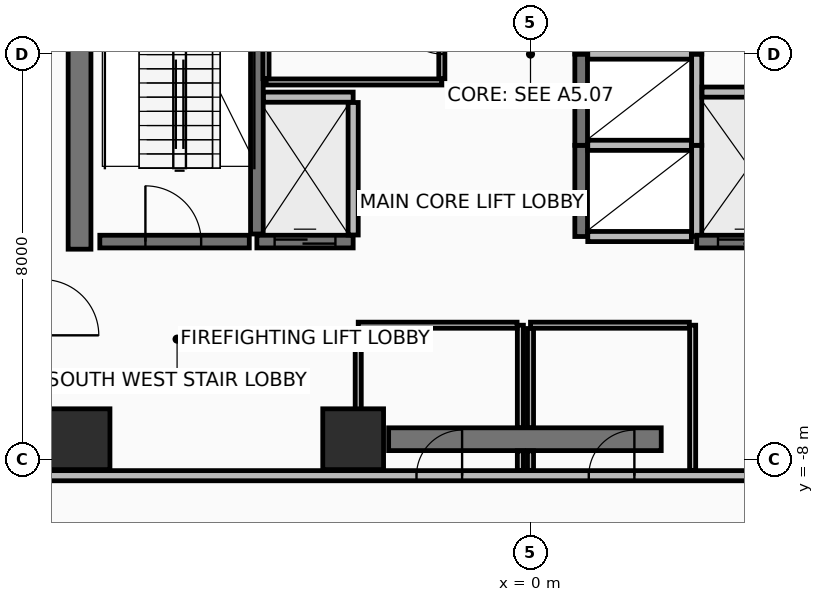
"""IFC4 building model, lengths in metres.
Left out: names, types, materials, properties, quantities, classifications, styles, units other than length and angle.
Written with IfcOpenShell. Run it as: python <this file> out.ifc"""

import sys

from ifc_helpers import new_model, si_unit, direction, frame, frame_2d, origin, origin_2d, place, context, subcontext, project, spatial, rectangle, extrude, element, fill, save


model = new_model("IFC4")
c1 = context("Model", 3, precision=1e-05, world=origin(), true_north=direction((0.0, 1.0)))
c2 = subcontext(c1, "Body", "Model", "MODEL_VIEW")
j1 = project(units=[si_unit("LENGTHUNIT", "METRE"), si_unit("PLANEANGLEUNIT", "RADIAN")], contexts=[c1])
p1 = place(None, origin())
s1 = spatial("IfcSite", under=j1, at=p1, CompositionType="ELEMENT")
p2 = place(p1, origin())
s2 = spatial("IfcBuilding", under=s1, at=p2, CompositionType="ELEMENT")
p3 = place(p2, frame((0.0, 0.0, 89.7)))
s3 = spatial("IfcBuildingStorey", under=s2, at=p3, CompositionType="ELEMENT", Elevation=89.7)
for number, where, z_axis, x_axis in (
    (1, (-8.9, -7.6, 0.0), (0.0, 0.0, 1.0), (1.0, 0.0, 0.0)),
    (2, (-3.5, -7.6, 0.0), (0.0, 0.0, 1.0), (1.0, 0.0, 0.0)),
):
    element("IfcColumn", number, at=place(p3, frame(where, z_axis=z_axis, x_axis=x_axis)), inside=s3, PredefinedType="COLUMN", context=c2, shape_type="SweptSolid", body=[
        extrude(rectangle(XDim=1.2, YDim=1.2, at=origin_2d()), origin(), (0.0, 0.0, 1.0), 3.6),
    ])
p4 = place(p3, frame((-2.8, -7.6, 0.0), z_axis=(0.0, 0.0, 1.0), x_axis=(1.0, 0.0, 0.0)))
e3 = element("IfcWall", 3, at=p4, inside=s3, PredefinedType="SHEAR", context=c2, shape_type="SweptSolid", body=[
    extrude(rectangle(XDim=5.38, YDim=0.45, at=frame_2d((2.69, 0.0))), origin(), (0.0, 0.0, 1.0), 3.41),
])
p5 = place(p3, frame((-8.9, -3.85, 0.0), z_axis=(0.0, 0.0, 1.0), x_axis=(0.0, 1.0, 0.0)))
e4 = element("IfcWall", 4, at=p5, inside=s3, PredefinedType="SHEAR", context=c2, shape_type="SweptSolid", body=[
    extrude(rectangle(XDim=10.7, YDim=0.45, at=frame_2d((5.35, 0.0))), origin(), (0.0, 0.0, 1.0), 3.41),
])
p6 = place(p3, frame((-9.62, -8.32, 0.0), z_axis=(0.0, 0.0, 1.0), x_axis=(1.0, 0.0, 0.0)))
e5 = element("IfcWall", 5, at=p6, inside=s3, PredefinedType="PARTITIONING", context=c2, shape_type="SweptSolid", body=[
    extrude(rectangle(XDim=19.24, YDim=0.2, at=frame_2d((9.62, 0.0))), origin(), (0.0, 0.0, 1.0), 2.805),
])
p7 = place(p6, frame((7.37, 0.0, 0.0)))
e6 = element("IfcOpeningElement", 6, at=p7, cuts=e5, PredefinedType="OPENING", context=c2, shape_type="SweptSolid", body=[
    extrude(rectangle(XDim=0.9, YDim=2.1, at=frame_2d((0.45, 1.05))), frame((0.0, 0.11, 0.0), z_axis=(0.0, -1.0, 0.0), x_axis=(1.0, 0.0, 0.0)), (0.0, 0.0, 1.0), 0.22),
])
p8 = place(p6, frame((10.77, 0.0, 0.0)))
e7 = element("IfcOpeningElement", 7, at=p8, cuts=e5, PredefinedType="OPENING", context=c2, shape_type="SweptSolid", body=[
    extrude(rectangle(XDim=0.9, YDim=2.1, at=frame_2d((0.45, 1.05))), frame((0.0, 0.11, 0.0), z_axis=(0.0, -1.0, 0.0), x_axis=(1.0, 0.0, 0.0)), (0.0, 0.0, 1.0), 0.22),
])
p9 = place(p3, frame((-5.4, -3.55, 0.0), z_axis=(0.0, 0.0, 1.0), x_axis=(0.0, 1.0, 0.0)))
e8 = element("IfcWall", 8, at=p9, inside=s3, PredefinedType="SHEAR", context=c2, shape_type="SweptSolid", body=[
    extrude(rectangle(XDim=7.3, YDim=0.25, at=frame_2d((3.65, 0.0))), origin(), (0.0, 0.0, 1.0), 3.41),
])
p10 = place(p3, frame((-8.5, -3.7, 0.0), z_axis=(0.0, 0.0, 1.0), x_axis=(1.0, 0.0, 0.0)))
e9 = element("IfcWall", 9, at=p10, inside=s3, PredefinedType="SHEAR", context=c2, shape_type="SweptSolid", body=[
    extrude(rectangle(XDim=2.95, YDim=0.25, at=frame_2d((1.475, 0.0))), origin(), (0.0, 0.0, 1.0), 3.41),
])
p11 = place(p10, frame((0.9, 0.0, 0.0)))
e10 = element("IfcOpeningElement", 10, at=p11, cuts=e9, PredefinedType="OPENING", context=c2, shape_type="SweptSolid", body=[
    extrude(rectangle(XDim=1.1, YDim=2.15, at=frame_2d((0.55, 1.075))), frame((0.0, 0.135, 0.0), z_axis=(0.0, -1.0, 0.0), x_axis=(1.0, 0.0, 0.0)), (0.0, 0.0, 1.0), 0.27),
])
p12 = place(p3, frame((1.0, -3.6, 0.0), z_axis=(0.0, 0.0, 1.0), x_axis=(0.0, 1.0, 0.0)))
e11 = element("IfcWall", 11, at=p12, inside=s3, PredefinedType="SHEAR", context=c2, shape_type="SweptSolid", body=[
    extrude(rectangle(XDim=1.8, YDim=0.25, at=frame_2d((0.9, 0.0))), origin(), (0.0, 0.0, 1.0), 3.41),
])
p13 = place(p3, frame((3.28, -3.6, 0.0), z_axis=(0.0, 0.0, 1.0), x_axis=(0.0, 1.0, 0.0)))
e12 = element("IfcWall", 12, at=p13, inside=s3, PredefinedType="PARTITIONING", context=c2, shape_type="SweptSolid", body=[
    extrude(rectangle(XDim=1.8, YDim=0.2, at=frame_2d((0.9, 0.0))), origin(), (0.0, 0.0, 1.0), 3.41),
])
for number, where, z_axis, x_axis in (
    (13, (1.13, -3.6, 0.0), (0.0, 0.0, 1.0), (1.0, 0.0, 0.0)),
    (14, (1.13, -1.8, 0.0), (0.0, 0.0, 1.0), (1.0, 0.0, 0.0)),
):
    element("IfcWall", number, at=place(p3, frame(where, z_axis=z_axis, x_axis=x_axis)), inside=s3, PredefinedType="PARTITIONING", context=c2, shape_type="SweptSolid", body=[
        extrude(rectangle(XDim=2.045, YDim=0.2, at=frame_2d((1.022, 0.0))), origin(), (0.0, 0.0, 1.0), 3.41),
    ])
p14 = place(p3, frame((1.0, -1.8, 0.0), z_axis=(0.0, 0.0, 1.0), x_axis=(0.0, 1.0, 0.0)))
e15 = element("IfcWall", 15, at=p14, inside=s3, PredefinedType="SHEAR", context=c2, shape_type="SweptSolid", body=[
    extrude(rectangle(XDim=1.8, YDim=0.25, at=frame_2d((0.9, 0.0))), origin(), (0.0, 0.0, 1.0), 3.41),
])
p15 = place(p3, frame((3.28, -1.8, 0.0), z_axis=(0.0, 0.0, 1.0), x_axis=(0.0, 1.0, 0.0)))
e16 = element("IfcWall", 16, at=p15, inside=s3, PredefinedType="PARTITIONING", context=c2, shape_type="SweptSolid", body=[
    extrude(rectangle(XDim=1.8, YDim=0.2, at=frame_2d((0.9, 0.0))), origin(), (0.0, 0.0, 1.0), 3.41),
])
p16 = place(p3, frame((1.13, 0.0, 0.0), z_axis=(0.0, 0.0, 1.0), x_axis=(1.0, 0.0, 0.0)))
e17 = element("IfcWall", 17, at=p16, inside=s3, PredefinedType="PARTITIONING", context=c2, shape_type="SweptSolid", body=[
    extrude(rectangle(XDim=2.045, YDim=0.2, at=frame_2d((1.022, 0.0))), origin(), (0.0, 0.0, 1.0), 3.41),
])
p17 = place(p3, frame((1.0, 0.0, 0.0), z_axis=(0.0, 0.0, 1.0), x_axis=(0.0, 1.0, 0.0)))
e18 = element("IfcWall", 18, at=p17, inside=s3, PredefinedType="SHEAR", context=c2, shape_type="SweptSolid", body=[
    extrude(rectangle(XDim=1.8, YDim=0.25, at=frame_2d((0.9, 0.0))), origin(), (0.0, 0.0, 1.0), 3.41),
])
p18 = place(p3, frame((3.28, 0.0, 0.0), z_axis=(0.0, 0.0, 1.0), x_axis=(0.0, 1.0, 0.0)))
e19 = element("IfcWall", 19, at=p18, inside=s3, PredefinedType="PARTITIONING", context=c2, shape_type="SweptSolid", body=[
    extrude(rectangle(XDim=1.8, YDim=0.2, at=frame_2d((0.9, 0.0))), origin(), (0.0, 0.0, 1.0), 3.41),
])
p19 = place(p3, frame((-5.4, -3.7, 0.0), z_axis=(0.0, 0.0, 1.0), x_axis=(1.0, 0.0, 0.0)))
e20 = element("IfcWall", 20, at=p19, inside=s3, PredefinedType="SHEAR", context=c2, shape_type="SweptSolid", body=[
    extrude(rectangle(XDim=1.9, YDim=0.25, at=frame_2d((0.95, 0.0))), origin(), (0.0, 0.0, 1.0), 3.41),
])
p20 = place(p19, frame((0.35, 0.0, 0.0)))
e21 = element("IfcOpeningElement", 21, at=p20, cuts=e20, PredefinedType="OPENING", context=c2, shape_type="SweptSolid", body=[
    extrude(rectangle(XDim=1.2, YDim=2.2, at=frame_2d((0.6, 1.1))), frame((0.0, 0.135, 0.0), z_axis=(0.0, -1.0, 0.0), x_axis=(1.0, 0.0, 0.0)), (0.0, 0.0, 1.0), 0.27),
])
p21 = place(p3, frame((-5.27, -0.85, 0.0), z_axis=(0.0, 0.0, 1.0), x_axis=(1.0, 0.0, 0.0)))
e22 = element("IfcWall", 22, at=p21, inside=s3, PredefinedType="PARTITIONING", context=c2, shape_type="SweptSolid", body=[
    extrude(rectangle(XDim=1.77, YDim=0.2, at=frame_2d((0.885, 0.0))), origin(), (0.0, 0.0, 1.0), 3.41),
])
p22 = place(p3, frame((-3.5, -3.57, 0.0), z_axis=(0.0, 0.0, 1.0), x_axis=(0.0, 1.0, 0.0)))
e23 = element("IfcWall", 23, at=p22, inside=s3, PredefinedType="PARTITIONING", context=c2, shape_type="SweptSolid", body=[
    extrude(rectangle(XDim=2.615, YDim=0.2, at=frame_2d((1.308, 0.0))), origin(), (0.0, 0.0, 1.0), 3.41),
])
p23 = place(p3, frame((3.28, -3.7, 0.0), z_axis=(0.0, 0.0, 1.0), x_axis=(1.0, 0.0, 0.0)))
e24 = element("IfcWall", 24, at=p23, inside=s3, PredefinedType="SHEAR", context=c2, shape_type="SweptSolid", body=[
    extrude(rectangle(XDim=1.94, YDim=0.25, at=frame_2d((0.97, 0.0))), origin(), (0.0, 0.0, 1.0), 3.41),
])
p24 = place(p23, frame((0.42, 0.0, 0.0)))
e25 = element("IfcOpeningElement", 25, at=p24, cuts=e24, PredefinedType="OPENING", context=c2, shape_type="SweptSolid", body=[
    extrude(rectangle(XDim=1.1, YDim=2.2, at=frame_2d((0.55, 1.1))), frame((0.0, 0.135, 0.0), z_axis=(0.0, -1.0, 0.0), x_axis=(1.0, 0.0, 0.0)), (0.0, 0.0, 1.0), 0.27),
])
p25 = place(p3, frame((3.385, -0.75, 0.0), z_axis=(0.0, 0.0, 1.0), x_axis=(1.0, 0.0, 0.0)))
e26 = element("IfcWall", 26, at=p25, inside=s3, PredefinedType="PARTITIONING", context=c2, shape_type="SweptSolid", body=[
    extrude(rectangle(XDim=1.835, YDim=0.2, at=frame_2d((0.917, 0.0))), origin(), (0.0, 0.0, 1.0), 3.41),
])
p26 = place(p3, frame((-5.22, -0.55, 0.0), z_axis=(0.0, 0.0, 1.0), x_axis=(1.0, 0.0, 0.0)))
e27 = element("IfcWall", 27, at=p26, inside=s3, PredefinedType="PARTITIONING", context=c2, shape_type="SweptSolid", body=[
    extrude(rectangle(XDim=3.47, YDim=0.12, at=frame_2d((1.735, 0.0))), origin(), (0.0, 0.0, 1.0), 3.41),
])
p27 = place(p3, frame((-1.75, -0.485, 0.0), z_axis=(0.0, 0.0, 1.0), x_axis=(0.0, 1.0, 0.0)))
e28 = element("IfcWall", 28, at=p27, inside=s3, PredefinedType="PARTITIONING", context=c2, shape_type="SweptSolid", body=[
    extrude(rectangle(XDim=1.825, YDim=0.12, at=frame_2d((0.913, 0.0))), origin(), (0.0, 0.0, 1.0), 3.41),
])
p28 = place(p27, frame((0.488, 0.0, 0.0)))
e29 = element("IfcOpeningElement", 29, at=p28, cuts=e28, PredefinedType="OPENING", context=c2, shape_type="SweptSolid", body=[
    extrude(rectangle(XDim=0.85, YDim=2.1, at=frame_2d((0.425, 1.05))), frame((0.0, 0.07, 0.0), z_axis=(0.0, -1.0, 0.0), x_axis=(1.0, 0.0, 0.0)), (0.0, 0.0, 1.0), 0.14),
])
p29 = place(p3, frame((-5.22, 1.275, 0.0), z_axis=(0.0, 0.0, 1.0), x_axis=(0.0, -1.0, 0.0)))
e30 = element("IfcWall", 30, at=p29, inside=s3, PredefinedType="PARTITIONING", context=c2, shape_type="SweptSolid", body=[
    extrude(rectangle(XDim=1.76, YDim=0.12, at=frame_2d((0.88, 0.0))), origin(), (0.0, 0.0, 1.0), 3.41),
])
p30 = place(p3, frame((-0.2, -8.215, 0.0), z_axis=(0.0, 0.0, 1.0), x_axis=(0.0, 1.0, 0.0)))
e31 = element("IfcWall", 31, at=p30, inside=s3, PredefinedType="PARTITIONING", context=c2, shape_type="SweptSolid", body=[
    extrude(rectangle(XDim=0.385, YDim=0.12, at=frame_2d((0.192, 0.0))), origin(), (0.0, 0.0, 1.0), 2.605),
])
p31 = place(p3, frame((-0.2, -7.37, 0.0), z_axis=(0.0, 0.0, 1.0), x_axis=(0.0, 1.0, 0.0)))
e32 = element("IfcWall", 32, at=p31, inside=s3, PredefinedType="PARTITIONING", context=c2, shape_type="SweptSolid", body=[
    extrude(rectangle(XDim=2.02, YDim=0.12, at=frame_2d((1.01, 0.0))), origin(), (0.0, 0.0, 1.0), 2.605),
])
p32 = place(p3, frame((-0.265, -5.35, 0.0), z_axis=(0.0, 0.0, 1.0), x_axis=(-1.0, 0.0, 0.0)))
e33 = element("IfcWall", 33, at=p32, inside=s3, PredefinedType="PARTITIONING", context=c2, shape_type="SweptSolid", body=[
    extrude(rectangle(XDim=3.135, YDim=0.12, at=frame_2d((1.567, 0.0))), origin(), (0.0, 0.0, 1.0), 2.605),
])
p33 = place(p3, frame((-3.4, -5.415, 0.0), z_axis=(0.0, 0.0, 1.0), x_axis=(0.0, -1.0, 0.0)))
e34 = element("IfcWall", 34, at=p33, inside=s3, PredefinedType="PARTITIONING", context=c2, shape_type="SweptSolid", body=[
    extrude(rectangle(XDim=2.8, YDim=0.12, at=frame_2d((1.4, 0.0))), origin(), (0.0, 0.0, 1.0), 2.605),
])
p34 = place(p3, frame((3.2, -8.215, 0.0), z_axis=(0.0, 0.0, 1.0), x_axis=(0.0, 1.0, 0.0)))
e35 = element("IfcWall", 35, at=p34, inside=s3, PredefinedType="PARTITIONING", context=c2, shape_type="SweptSolid", body=[
    extrude(rectangle(XDim=2.865, YDim=0.12, at=frame_2d((1.433, 0.0))), origin(), (0.0, 0.0, 1.0), 2.605),
])
p35 = place(p3, frame((3.135, -5.35, 0.0), z_axis=(0.0, 0.0, 1.0), x_axis=(-1.0, 0.0, 0.0)))
e36 = element("IfcWall", 36, at=p35, inside=s3, PredefinedType="PARTITIONING", context=c2, shape_type="SweptSolid", body=[
    extrude(rectangle(XDim=3.135, YDim=0.12, at=frame_2d((1.567, 0.0))), origin(), (0.0, 0.0, 1.0), 3.41),
])
p36 = place(p3, frame((0.0, -5.415, 0.0), z_axis=(0.0, 0.0, 1.0), x_axis=(0.0, -1.0, 0.0)))
e37 = element("IfcWall", 37, at=p36, inside=s3, PredefinedType="PARTITIONING", context=c2, shape_type="SweptSolid", body=[
    extrude(rectangle(XDim=1.955, YDim=0.12, at=frame_2d((0.978, 0.0))), origin(), (0.0, 0.0, 1.0), 2.605),
])
p37 = place(p3, frame((0.0, -7.83, 0.0), z_axis=(0.0, 0.0, 1.0), x_axis=(0.0, -1.0, 0.0)))
e38 = element("IfcWall", 38, at=p37, inside=s3, PredefinedType="PARTITIONING", context=c2, shape_type="SweptSolid", body=[
    extrude(rectangle(XDim=0.385, YDim=0.12, at=frame_2d((0.192, 0.0))), origin(), (0.0, 0.0, 1.0), 2.605),
])
p38 = place(p11, origin())
e39 = element("IfcDoor", 39, at=p38, inside=s3, OperationType="SINGLE_SWING_LEFT", PredefinedType="DOOR", context=c2, shape_type="SweptSolid", body=[
    extrude(rectangle(XDim=1.1, YDim=2.15, at=frame_2d((0.55, 1.075))), frame((0.0, 0.025, 0.0), z_axis=(0.0, -1.0, 0.0), x_axis=(1.0, 0.0, 0.0)), (0.0, 0.0, 1.0), 0.05),
])
fill(e10, e39)
p39 = place(p20, origin())
e40 = element("IfcDoor", 40, at=p39, inside=s3, OperationType="SLIDING_TO_RIGHT", PredefinedType="DOOR", context=c2, shape_type="SweptSolid", body=[
    extrude(rectangle(XDim=1.2, YDim=2.2, at=frame_2d((0.6, 1.1))), frame((0.0, 0.025, 0.0), z_axis=(0.0, -1.0, 0.0), x_axis=(1.0, 0.0, 0.0)), (0.0, 0.0, 1.0), 0.05),
])
fill(e21, e40)
p40 = place(p24, origin())
e41 = element("IfcDoor", 41, at=p40, inside=s3, OperationType="SLIDING_TO_LEFT", PredefinedType="DOOR", context=c2, shape_type="SweptSolid", body=[
    extrude(rectangle(XDim=1.1, YDim=2.2, at=frame_2d((0.55, 1.1))), frame((0.0, 0.025, 0.0), z_axis=(0.0, -1.0, 0.0), x_axis=(1.0, 0.0, 0.0)), (0.0, 0.0, 1.0), 0.05),
])
fill(e25, e41)
p41 = place(p28, frame((0.85, 0.0, 0.0), z_axis=(0.0, 0.0, 1.0), x_axis=(-1.0, 0.0, 0.0)))
e42 = element("IfcDoor", 42, at=p41, inside=s3, OperationType="SINGLE_SWING_RIGHT", PredefinedType="DOOR", context=c2, shape_type="SweptSolid", body=[
    extrude(rectangle(XDim=0.85, YDim=2.1, at=frame_2d((0.425, 1.05))), frame((0.0, 0.025, 0.0), z_axis=(0.0, -1.0, 0.0), x_axis=(1.0, 0.0, 0.0)), (0.0, 0.0, 1.0), 0.05),
])
fill(e29, e42)
p42 = place(p7, frame((0.9, 0.0, 0.0), z_axis=(0.0, 0.0, 1.0), x_axis=(-1.0, 0.0, 0.0)))
e43 = element("IfcDoor", 43, at=p42, inside=s3, OperationType="SINGLE_SWING_LEFT", PredefinedType="DOOR", context=c2, shape_type="SweptSolid", body=[
    extrude(rectangle(XDim=0.9, YDim=2.1, at=frame_2d((0.45, 1.05))), frame((0.0, 0.025, 0.0), z_axis=(0.0, -1.0, 0.0), x_axis=(1.0, 0.0, 0.0)), (0.0, 0.0, 1.0), 0.05),
])
fill(e6, e43)
p43 = place(p8, frame((0.9, 0.0, 0.0), z_axis=(0.0, 0.0, 1.0), x_axis=(-1.0, 0.0, 0.0)))
e44 = element("IfcDoor", 44, at=p43, inside=s3, OperationType="SINGLE_SWING_LEFT", PredefinedType="DOOR", context=c2, shape_type="SweptSolid", body=[
    extrude(rectangle(XDim=0.9, YDim=2.1, at=frame_2d((0.45, 1.05))), frame((0.0, 0.025, 0.0), z_axis=(0.0, -1.0, 0.0), x_axis=(1.0, 0.0, 0.0)), (0.0, 0.0, 1.0), 0.05),
])
fill(e7, e44)
save(model, sys.argv[1])
